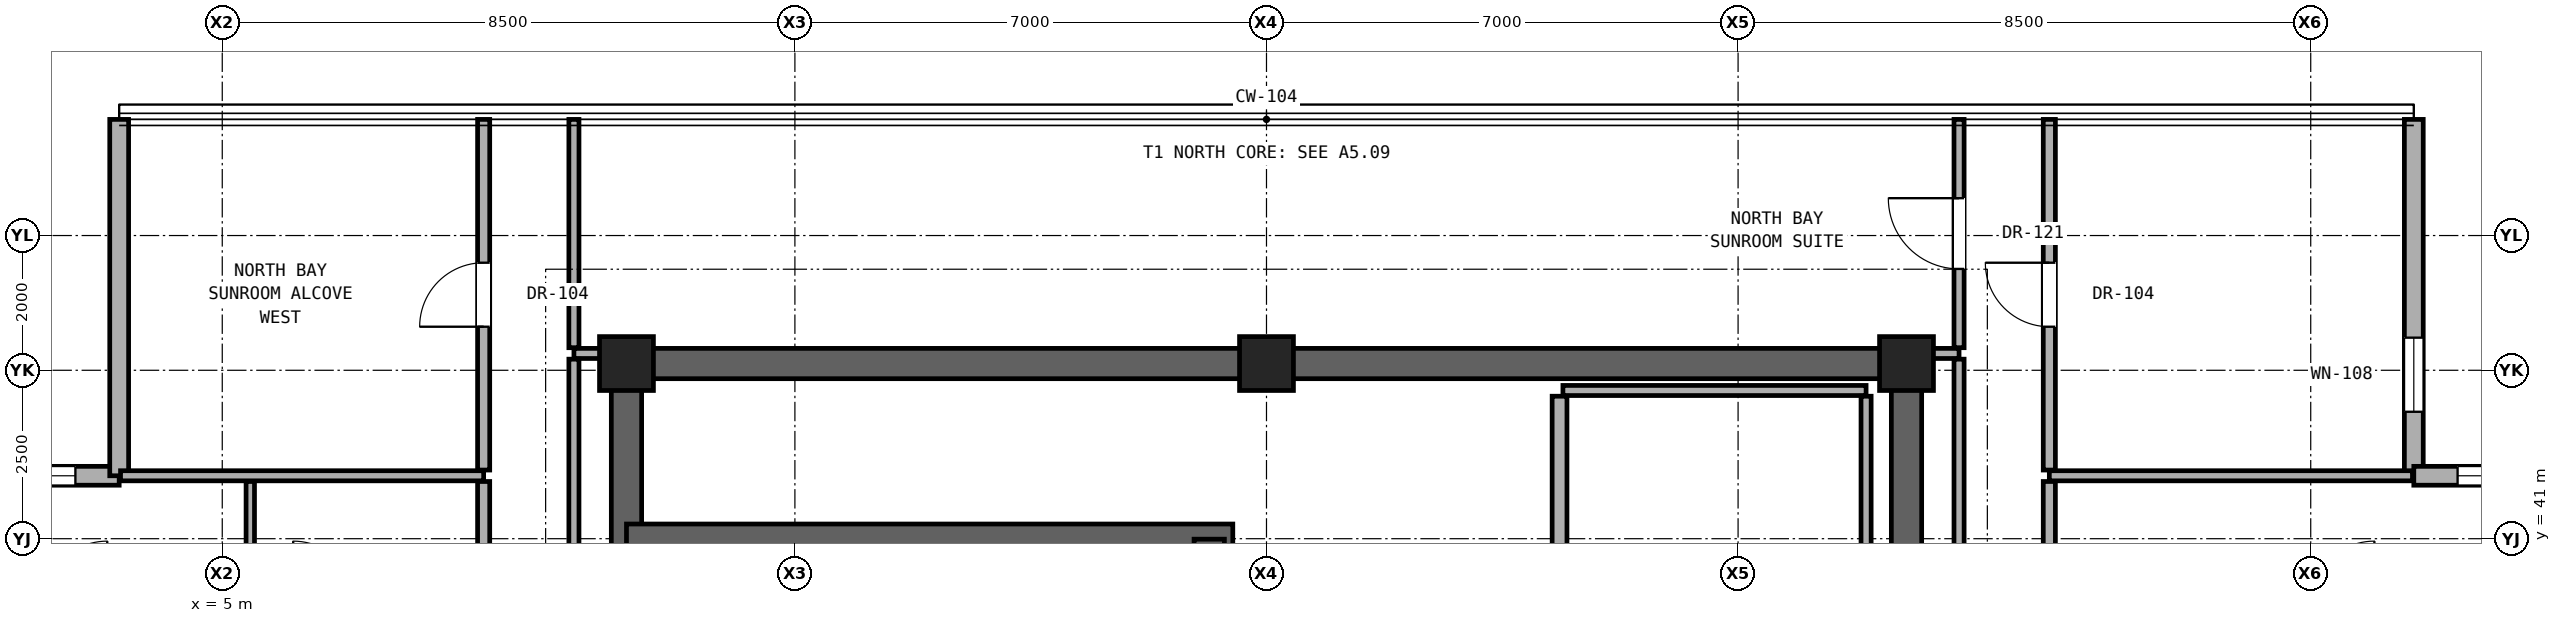
"""IFC4 building model, lengths in metres.
Left out: names, types, materials, properties, quantities, classifications, styles, units other than length and angle.
Written with IfcOpenShell. Run it as: python <this file> out.ifc"""

import sys

from ifc_helpers import new_model, si_unit, direction, frame, frame_2d, origin, origin_2d, place, context, subcontext, project, spatial, rectangle, extrude, element, fill, save


model = new_model("IFC4")
c1 = context("Model", 3, precision=1e-05, world=origin(), true_north=direction((0.0, 1.0)))
c2 = subcontext(c1, "Body", "Model", "MODEL_VIEW")
j1 = project(units=[si_unit("LENGTHUNIT", "METRE"), si_unit("PLANEANGLEUNIT", "RADIAN")], contexts=[c1])
p1 = place(None, origin())
s1 = spatial("IfcSite", under=j1, at=p1, CompositionType="ELEMENT")
p2 = place(p1, origin())
s2 = spatial("IfcBuilding", under=s1, at=p2, CompositionType="ELEMENT")
p3 = place(p2, frame((0.0, 0.0, 245.8)))
s3 = spatial("IfcBuildingStorey", under=s2, at=p3, CompositionType="ELEMENT", Elevation=245.8)
for number, where, z_axis, x_axis in (
    (1, (11.0, 43.6, 0.0), (0.0, 0.0, 1.0), (1.0, 0.0, 0.0)),
    (2, (20.5, 43.6, 0.0), (0.0, 0.0, 1.0), (1.0, 0.0, 0.0)),
    (3, (30.0, 43.6, 0.0), (0.0, 0.0, 1.0), (1.0, 0.0, 0.0)),
):
    element("IfcColumn", number, at=place(p3, frame(where, z_axis=z_axis, x_axis=x_axis)), inside=s3, PredefinedType="COLUMN", context=c2, shape_type="SweptSolid", body=[
        extrude(rectangle(XDim=0.8, YDim=0.8, at=origin_2d()), origin(), (0.0, 0.0, 1.0), 3.3),
    ])
p4 = place(p3, frame((11.0, 43.6, 0.0), z_axis=(0.0, 0.0, 1.0), x_axis=(1.0, 0.0, 0.0)))
e4 = element("IfcWall", 4, at=p4, inside=s3, PredefinedType="SHEAR", context=c2, shape_type="SweptSolid", body=[
    extrude(rectangle(XDim=19.0, YDim=0.45, at=frame_2d((9.5, 0.0))), origin(), (0.0, 0.0, 1.0), 3.1),
])
for number, where, z_axis, x_axis in (
    (5, (11.0, 37.6, 0.0), (0.0, 0.0, 1.0), (0.0, 1.0, 0.0)),
    (6, (30.0, 37.6, 0.0), (0.0, 0.0, 1.0), (0.0, 1.0, 0.0)),
):
    element("IfcWall", number, at=place(p3, frame(where, z_axis=z_axis, x_axis=x_axis)), inside=s3, PredefinedType="SHEAR", context=c2, shape_type="SweptSolid", body=[
        extrude(rectangle(XDim=6.0, YDim=0.45, at=frame_2d((3.0, 0.0))), origin(), (0.0, 0.0, 1.0), 3.1),
    ])
p5 = place(p3, frame((11.0, 40.993, 0.0), z_axis=(0.0, 0.0, 1.0), x_axis=(1.0, 0.0, 0.0)))
e7 = element("IfcWall", 7, at=p5, inside=s3, PredefinedType="SHEAR", context=c2, shape_type="SweptSolid", body=[
    extrude(rectangle(XDim=9.0, YDim=0.45, at=frame_2d((4.5, 0.0))), origin(), (0.0, 0.0, 1.0), 3.1),
])
p6 = place(p3, frame((19.65, 37.6, 0.0), z_axis=(0.0, 0.0, 1.0), x_axis=(0.0, 1.0, 0.0)))
e8 = element("IfcWall", 8, at=p6, inside=s3, PredefinedType="SHEAR", context=c2, shape_type="SweptSolid", body=[
    extrude(rectangle(XDim=3.393, YDim=0.45, at=frame_2d((1.696, 0.0))), origin(), (0.0, 0.0, 1.0), 3.1),
])
p7 = place(p3, frame((37.53, 41.934, 0.0), z_axis=(0.0, 0.0, 1.0), x_axis=(0.0, 1.0, 0.0)))
e9 = element("IfcWall", 9, at=p7, inside=s3, PredefinedType="SOLIDWALL", context=c2, shape_type="SweptSolid", body=[
    extrude(rectangle(XDim=5.29, YDim=0.28, at=frame_2d((2.645, 0.0))), origin(), (0.0, 0.0, 1.0), 3.08),
])
p8 = place(p7, frame((0.95, 0.0, 0.85)))
e10 = element("IfcOpeningElement", 10, at=p8, cuts=e9, PredefinedType="OPENING", context=c2, shape_type="SweptSolid", body=[
    extrude(rectangle(XDim=1.1, YDim=2.0, at=frame_2d((0.55, 1.0))), frame((0.0, 0.15, 0.0), z_axis=(0.0, -1.0, 0.0), x_axis=(1.0, 0.0, 0.0)), (0.0, 0.0, 1.0), 0.3),
])
p9 = place(p3, frame((3.47, 41.934, 0.0), z_axis=(0.0, 0.0, 1.0), x_axis=(-1.0, 0.0, 0.0)))
e11 = element("IfcWall", 11, at=p9, inside=s3, PredefinedType="SOLIDWALL", context=c2, shape_type="SweptSolid", body=[
    extrude(rectangle(XDim=5.29, YDim=0.28, at=frame_2d((2.645, 0.0))), origin(), (0.0, 0.0, 1.0), 3.08),
])
p10 = place(p9, frame((0.65, 0.0, 0.85)))
e12 = element("IfcOpeningElement", 12, at=p10, cuts=e11, PredefinedType="OPENING", context=c2, shape_type="SweptSolid", body=[
    extrude(rectangle(XDim=1.1, YDim=2.0, at=frame_2d((0.55, 1.0))), frame((0.0, 0.15, 0.0), z_axis=(0.0, -1.0, 0.0), x_axis=(1.0, 0.0, 0.0)), (0.0, 0.0, 1.0), 0.3),
])
p11 = place(p3, frame((3.47, 47.224, 0.0), z_axis=(0.0, 0.0, 1.0), x_axis=(0.0, -1.0, 0.0)))
e13 = element("IfcWall", 13, at=p11, inside=s3, PredefinedType="SOLIDWALL", context=c2, shape_type="SweptSolid", body=[
    extrude(rectangle(XDim=5.29, YDim=0.28, at=frame_2d((2.645, 0.0))), origin(), (0.0, 0.0, 1.0), 3.08),
])
p12 = place(p3, frame((42.82, 41.934, 0.0), z_axis=(0.0, 0.0, 1.0), x_axis=(-1.0, 0.0, 0.0)))
e14 = element("IfcWall", 14, at=p12, inside=s3, PredefinedType="SOLIDWALL", context=c2, shape_type="SweptSolid", body=[
    extrude(rectangle(XDim=5.29, YDim=0.28, at=frame_2d((2.645, 0.0))), origin(), (0.0, 0.0, 1.0), 3.08),
])
p13 = place(p12, frame((3.54, 0.0, 0.85)))
e15 = element("IfcOpeningElement", 15, at=p13, cuts=e14, PredefinedType="OPENING", context=c2, shape_type="SweptSolid", body=[
    extrude(rectangle(XDim=1.1, YDim=2.0, at=frame_2d((0.55, 1.0))), frame((0.0, 0.15, 0.0), z_axis=(0.0, -1.0, 0.0), x_axis=(1.0, 0.0, 0.0)), (0.0, 0.0, 1.0), 0.3),
])
for number, where, z_axis, x_axis in (
    (16, (3.49, 41.934, 0.0), (0.0, 0.0, 1.0), (1.0, 0.0, 0.0)),
    (17, (32.12, 41.934, 0.0), (0.0, 0.0, 1.0), (1.0, 0.0, 0.0)),
):
    element("IfcWall", number, at=place(p3, frame(where, z_axis=z_axis, x_axis=x_axis)), inside=s3, PredefinedType="PARTITIONING", context=c2, shape_type="SweptSolid", body=[
        extrude(rectangle(XDim=5.39, YDim=0.15, at=frame_2d((2.695, 0.0))), origin(), (0.0, 0.0, 1.0), 3.1),
    ])
p14 = place(p3, frame((24.9, 43.2, 0.0), z_axis=(0.0, 0.0, 1.0), x_axis=(1.0, 0.0, 0.0)))
e18 = element("IfcWall", 18, at=p14, inside=s3, PredefinedType="PARTITIONING", context=c2, shape_type="SweptSolid", body=[
    extrude(rectangle(XDim=4.5, YDim=0.15, at=frame_2d((2.25, 0.0))), origin(), (0.0, 0.0, 1.0), 3.1),
])
for number, where, z_axis, x_axis in (
    (19, (10.22, 43.75, 0.0), (0.0, 0.0, 1.0), (1.0, 0.0, 0.0)),
    (20, (30.22, 43.75, 0.0), (0.0, 0.0, 1.0), (1.0, 0.0, 0.0)),
):
    element("IfcWall", number, at=place(p3, frame(where, z_axis=z_axis, x_axis=x_axis)), inside=s3, PredefinedType="PARTITIONING", context=c2, shape_type="SweptSolid", body=[
        extrude(rectangle(XDim=0.56, YDim=0.15, at=frame_2d((0.28, 0.0))), origin(), (0.0, 0.0, 1.0), 3.1),
    ])
p15 = place(p3, frame((5.416, 40.114, 0.0), z_axis=(0.0, 0.0, 1.0), x_axis=(0.0, 1.0, 0.0)))
e21 = element("IfcWall", 21, at=p15, inside=s3, PredefinedType="PARTITIONING", context=c2, shape_type="SweptSolid", body=[
    extrude(rectangle(XDim=1.735, YDim=0.125, at=frame_2d((0.868, 0.0))), origin(), (0.0, 0.0, 1.0), 3.1),
])
p16 = place(p3, frame((8.88, 40.114, 0.0), z_axis=(0.0, 0.0, 1.0), x_axis=(0.0, 1.0, 0.0)))
e22 = element("IfcWall", 22, at=p16, inside=s3, PredefinedType="PARTITIONING", context=c2, shape_type="SweptSolid", body=[
    extrude(rectangle(XDim=1.735, YDim=0.18, at=frame_2d((0.868, 0.0))), origin(), (0.0, 0.0, 1.0), 3.1),
])
p17 = place(p3, frame((8.88, 42.019, 0.0), z_axis=(0.0, 0.0, 1.0), x_axis=(0.0, 1.0, 0.0)))
e23 = element("IfcWall", 23, at=p17, inside=s3, PredefinedType="PARTITIONING", context=c2, shape_type="SweptSolid", body=[
    extrude(rectangle(XDim=5.205, YDim=0.18, at=frame_2d((2.603, 0.0))), origin(), (0.0, 0.0, 1.0), 3.1),
])
p18 = place(p17, frame((2.127, 0.0, 0.0)))
e24 = element("IfcOpeningElement", 24, at=p18, cuts=e23, PredefinedType="OPENING", context=c2, shape_type="SweptSolid", body=[
    extrude(rectangle(XDim=0.95, YDim=2.15, at=frame_2d((0.475, 1.075))), frame((0.0, 0.1, 0.0), z_axis=(0.0, -1.0, 0.0), x_axis=(1.0, 0.0, 0.0)), (0.0, 0.0, 1.0), 0.2),
])
p19 = place(p3, frame((10.22, 34.535, 0.0), z_axis=(0.0, 0.0, 1.0), x_axis=(0.0, 1.0, 0.0)))
e25 = element("IfcWall", 25, at=p19, inside=s3, PredefinedType="PARTITIONING", context=c2, shape_type="SweptSolid", body=[
    extrude(rectangle(XDim=9.13, YDim=0.15, at=frame_2d((4.565, 0.0))), origin(), (0.0, 0.0, 1.0), 2.492),
])
p20 = place(p3, frame((10.22, 43.835, 0.0), z_axis=(0.0, 0.0, 1.0), x_axis=(0.0, 1.0, 0.0)))
e26 = element("IfcWall", 26, at=p20, inside=s3, PredefinedType="PARTITIONING", context=c2, shape_type="SweptSolid", body=[
    extrude(rectangle(XDim=3.389, YDim=0.15, at=frame_2d((1.695, 0.0))), origin(), (0.0, 0.0, 1.0), 3.1),
])
p21 = place(p3, frame((24.85, 40.26, 0.0), z_axis=(0.0, 0.0, 1.0), x_axis=(0.0, 1.0, 0.0)))
e27 = element("IfcWall", 27, at=p21, inside=s3, PredefinedType="SOLIDWALL", context=c2, shape_type="SweptSolid", body=[
    extrude(rectangle(XDim=2.855, YDim=0.22, at=frame_2d((1.427, 0.0))), origin(), (0.0, 0.0, 1.0), 3.1),
])
p22 = place(p3, frame((29.4, 37.82, 0.0), z_axis=(0.0, 0.0, 1.0), x_axis=(0.0, 1.0, 0.0)))
e28 = element("IfcWall", 28, at=p22, inside=s3, PredefinedType="PARTITIONING", context=c2, shape_type="SweptSolid", body=[
    extrude(rectangle(XDim=5.295, YDim=0.15, at=frame_2d((2.647, 0.0))), origin(), (0.0, 0.0, 1.0), 3.1),
])
p23 = place(p3, frame((30.78, 34.57, 0.0), z_axis=(0.0, 0.0, 1.0), x_axis=(0.0, 1.0, 0.0)))
e29 = element("IfcWall", 29, at=p23, inside=s3, PredefinedType="PARTITIONING", context=c2, shape_type="SweptSolid", body=[
    extrude(rectangle(XDim=9.095, YDim=0.15, at=frame_2d((4.547, 0.0))), origin(), (0.0, 0.0, 1.0), 2.492),
])
p24 = place(p3, frame((30.78, 43.835, 0.0), z_axis=(0.0, 0.0, 1.0), x_axis=(0.0, 1.0, 0.0)))
e30 = element("IfcWall", 30, at=p24, inside=s3, PredefinedType="PARTITIONING", context=c2, shape_type="SweptSolid", body=[
    extrude(rectangle(XDim=3.389, YDim=0.15, at=frame_2d((1.695, 0.0))), origin(), (0.0, 0.0, 1.0), 3.1),
])
p25 = place(p24, frame((1.169, 0.0, 0.0)))
e31 = element("IfcOpeningElement", 31, at=p25, cuts=e30, PredefinedType="OPENING", context=c2, shape_type="SweptSolid", body=[
    extrude(rectangle(XDim=1.05, YDim=2.2, at=frame_2d((0.525, 1.1))), frame((0.0, 0.085, 0.0), z_axis=(0.0, -1.0, 0.0), x_axis=(1.0, 0.0, 0.0)), (0.0, 0.0, 1.0), 0.17),
])
p26 = place(p3, frame((32.12, 40.114, 0.0), z_axis=(0.0, 0.0, 1.0), x_axis=(0.0, 1.0, 0.0)))
e32 = element("IfcWall", 32, at=p26, inside=s3, PredefinedType="PARTITIONING", context=c2, shape_type="SweptSolid", body=[
    extrude(rectangle(XDim=1.735, YDim=0.18, at=frame_2d((0.868, 0.0))), origin(), (0.0, 0.0, 1.0), 3.1),
])
p27 = place(p3, frame((32.12, 42.019, 0.0), z_axis=(0.0, 0.0, 1.0), x_axis=(0.0, 1.0, 0.0)))
e33 = element("IfcWall", 33, at=p27, inside=s3, PredefinedType="PARTITIONING", context=c2, shape_type="SweptSolid", body=[
    extrude(rectangle(XDim=5.205, YDim=0.18, at=frame_2d((2.603, 0.0))), origin(), (0.0, 0.0, 1.0), 3.1),
])
p28 = place(p27, frame((2.127, 0.0, 0.0)))
e34 = element("IfcOpeningElement", 34, at=p28, cuts=e33, PredefinedType="OPENING", context=c2, shape_type="SweptSolid", body=[
    extrude(rectangle(XDim=0.95, YDim=2.15, at=frame_2d((0.475, 1.075))), frame((0.0, 0.1, 0.0), z_axis=(0.0, -1.0, 0.0), x_axis=(1.0, 0.0, 0.0)), (0.0, 0.0, 1.0), 0.2),
])
p29 = place(p8, origin())
e35 = element("IfcWindow", 35, at=p29, inside=s3, PartitioningType="SINGLE_PANEL", PredefinedType="WINDOW", context=c2, shape_type="SweptSolid", body=[
    extrude(rectangle(XDim=1.1, YDim=2.0, at=frame_2d((0.55, 1.0))), frame((0.0, 0.03, 0.0), z_axis=(0.0, -1.0, 0.0), x_axis=(1.0, 0.0, 0.0)), (0.0, 0.0, 1.0), 0.06),
])
fill(e10, e35)
p30 = place(p10, origin())
e36 = element("IfcWindow", 36, at=p30, inside=s3, PartitioningType="SINGLE_PANEL", PredefinedType="WINDOW", context=c2, shape_type="SweptSolid", body=[
    extrude(rectangle(XDim=1.1, YDim=2.0, at=frame_2d((0.55, 1.0))), frame((0.0, 0.03, 0.0), z_axis=(0.0, -1.0, 0.0), x_axis=(1.0, 0.0, 0.0)), (0.0, 0.0, 1.0), 0.06),
])
fill(e12, e36)
p31 = place(p13, origin())
e37 = element("IfcWindow", 37, at=p31, inside=s3, PartitioningType="SINGLE_PANEL", PredefinedType="WINDOW", context=c2, shape_type="SweptSolid", body=[
    extrude(rectangle(XDim=1.1, YDim=2.0, at=frame_2d((0.55, 1.0))), frame((0.0, 0.03, 0.0), z_axis=(0.0, -1.0, 0.0), x_axis=(1.0, 0.0, 0.0)), (0.0, 0.0, 1.0), 0.06),
])
fill(e15, e37)
p32 = place(p25, origin())
e38 = element("IfcDoor", 38, at=p32, inside=s3, OperationType="SINGLE_SWING_RIGHT", PredefinedType="DOOR", context=c2, shape_type="SweptSolid", body=[
    extrude(rectangle(XDim=1.05, YDim=2.2, at=frame_2d((0.525, 1.1))), frame((0.0, 0.025, 0.0), z_axis=(0.0, -1.0, 0.0), x_axis=(1.0, 0.0, 0.0)), (0.0, 0.0, 1.0), 0.05),
])
fill(e31, e38)
p33 = place(p18, origin())
e39 = element("IfcDoor", 39, at=p33, inside=s3, OperationType="SINGLE_SWING_LEFT", PredefinedType="DOOR", context=c2, shape_type="SweptSolid", body=[
    extrude(rectangle(XDim=0.95, YDim=2.15, at=frame_2d((0.475, 1.075))), frame((0.0, 0.025, 0.0), z_axis=(0.0, -1.0, 0.0), x_axis=(1.0, 0.0, 0.0)), (0.0, 0.0, 1.0), 0.05),
])
fill(e24, e39)
p34 = place(p28, origin())
e40 = element("IfcDoor", 40, at=p34, inside=s3, OperationType="SINGLE_SWING_RIGHT", PredefinedType="DOOR", context=c2, shape_type="SweptSolid", body=[
    extrude(rectangle(XDim=0.95, YDim=2.15, at=frame_2d((0.475, 1.075))), frame((0.0, 0.025, 0.0), z_axis=(0.0, -1.0, 0.0), x_axis=(1.0, 0.0, 0.0)), (0.0, 0.0, 1.0), 0.05),
])
fill(e34, e40)
save(model, sys.argv[1])
